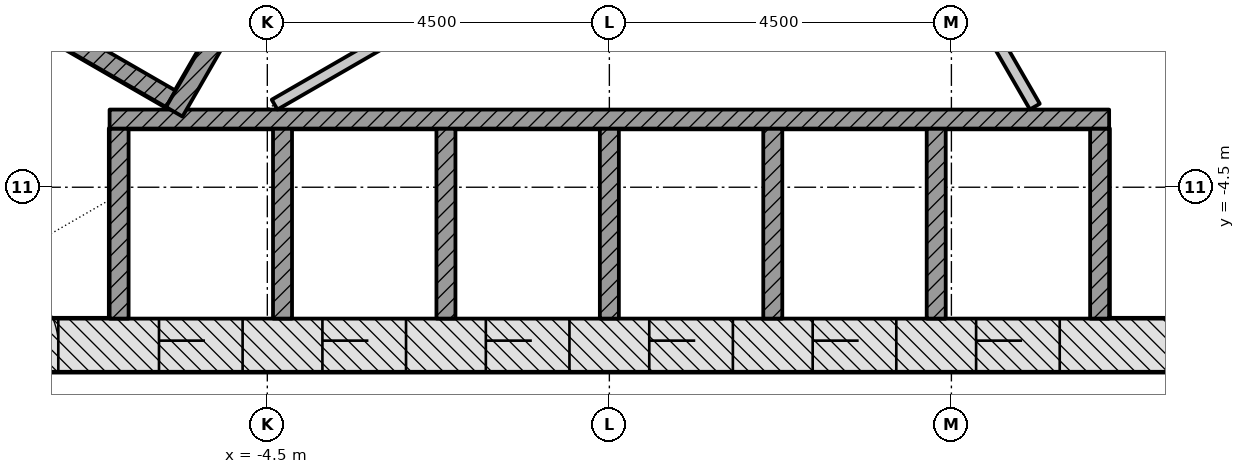
"""IFC4 building model, lengths in metres.
Left out: names, types, materials, properties, quantities, classifications, styles, units other than length and angle.
Written with IfcOpenShell. Run it as: python <this file> out.ifc"""

import sys

from ifc_helpers import new_model, si_unit, direction, frame, frame_2d, origin, place, context, subcontext, project, spatial, rectangle, extrude, element, fill, save


model = new_model("IFC4")
c1 = context("Model", 3, precision=1e-05, world=origin(), true_north=direction((0.0, 1.0)))
c2 = subcontext(c1, "Body", "Model", "MODEL_VIEW")
j1 = project(units=[si_unit("LENGTHUNIT", "METRE"), si_unit("PLANEANGLEUNIT", "RADIAN")], contexts=[c1])
p1 = place(None, origin())
s1 = spatial("IfcSite", under=j1, at=p1, CompositionType="ELEMENT")
p2 = place(p1, origin())
s2 = spatial("IfcBuilding", under=s1, at=p2, CompositionType="ELEMENT")
p3 = place(p2, frame((0.0, 0.0, 24.0)))
s3 = spatial("IfcBuildingStorey", under=s2, at=p3, CompositionType="ELEMENT", Elevation=24.0)
p4 = place(p3, frame((-9.229, -6.578, -0.2), z_axis=(0.0, 0.0, 1.0), x_axis=(1.0, 0.0, 0.0)))
e1 = element("IfcWall", 1, at=p4, inside=s3, PredefinedType="SHEAR", context=c2, shape_type="SweptSolid", body=[
    extrude(rectangle(XDim=18.458, YDim=0.7, at=frame_2d((9.229, 0.0))), origin(), (0.0, 0.0, 1.0), 3.6),
])
p5 = place(p4, frame((3.304, 0.0, 0.2)))
e2 = element("IfcOpeningElement", 2, at=p5, cuts=e1, PredefinedType="OPENING", context=c2, shape_type="SweptSolid", body=[
    extrude(rectangle(XDim=1.1, YDim=2.1, at=frame_2d((0.55, 1.05))), frame((0.0, 0.36, 0.0), z_axis=(0.0, -1.0, 0.0), x_axis=(1.0, 0.0, 0.0)), (0.0, 0.0, 1.0), 0.72),
])
p6 = place(p4, frame((5.454, 0.0, 0.2)))
e3 = element("IfcOpeningElement", 3, at=p6, cuts=e1, PredefinedType="OPENING", context=c2, shape_type="SweptSolid", body=[
    extrude(rectangle(XDim=1.1, YDim=2.1, at=frame_2d((0.55, 1.05))), frame((0.0, 0.36, 0.0), z_axis=(0.0, -1.0, 0.0), x_axis=(1.0, 0.0, 0.0)), (0.0, 0.0, 1.0), 0.72),
])
p7 = place(p4, frame((7.604, 0.0, 0.2)))
e4 = element("IfcOpeningElement", 4, at=p7, cuts=e1, PredefinedType="OPENING", context=c2, shape_type="SweptSolid", body=[
    extrude(rectangle(XDim=1.1, YDim=2.1, at=frame_2d((0.55, 1.05))), frame((0.0, 0.36, 0.0), z_axis=(0.0, -1.0, 0.0), x_axis=(1.0, 0.0, 0.0)), (0.0, 0.0, 1.0), 0.72),
])
p8 = place(p4, frame((9.754, 0.0, 0.2)))
e5 = element("IfcOpeningElement", 5, at=p8, cuts=e1, PredefinedType="OPENING", context=c2, shape_type="SweptSolid", body=[
    extrude(rectangle(XDim=1.1, YDim=2.1, at=frame_2d((0.55, 1.05))), frame((0.0, 0.36, 0.0), z_axis=(0.0, -1.0, 0.0), x_axis=(1.0, 0.0, 0.0)), (0.0, 0.0, 1.0), 0.72),
])
p9 = place(p4, frame((11.904, 0.0, 0.2)))
e6 = element("IfcOpeningElement", 6, at=p9, cuts=e1, PredefinedType="OPENING", context=c2, shape_type="SweptSolid", body=[
    extrude(rectangle(XDim=1.1, YDim=2.1, at=frame_2d((0.55, 1.05))), frame((0.0, 0.36, 0.0), z_axis=(0.0, -1.0, 0.0), x_axis=(1.0, 0.0, 0.0)), (0.0, 0.0, 1.0), 0.72),
])
p10 = place(p4, frame((14.054, 0.0, 0.2)))
e7 = element("IfcOpeningElement", 7, at=p10, cuts=e1, PredefinedType="OPENING", context=c2, shape_type="SweptSolid", body=[
    extrude(rectangle(XDim=1.1, YDim=2.1, at=frame_2d((0.55, 1.05))), frame((0.0, 0.36, 0.0), z_axis=(0.0, -1.0, 0.0), x_axis=(1.0, 0.0, 0.0)), (0.0, 0.0, 1.0), 0.72),
])
p11 = place(p4, frame((1.079, 0.0, 0.2)))
e8 = element("IfcOpeningElement", 8, at=p11, cuts=e1, PredefinedType="OPENING", context=c2, shape_type="SweptSolid", body=[
    extrude(rectangle(XDim=0.9, YDim=2.1, at=frame_2d((0.45, 1.05))), frame((0.0, 0.36, 0.0), z_axis=(0.0, -1.0, 0.0), x_axis=(1.0, 0.0, 0.0)), (0.0, 0.0, 1.0), 0.72),
])
p12 = place(p3, frame((10.311, -4.703, -0.2), z_axis=(0.0, 0.0, 1.0), x_axis=(-0.500001446645, 0.866024568562, 0.0)))
e9 = element("IfcWall", 9, at=p12, inside=s3, PredefinedType="SHEAR", context=c2, shape_type="SweptSolid", body=[
    extrude(rectangle(XDim=18.458, YDim=0.7, at=frame_2d((9.229, 0.0))), origin(), (0.0, 0.0, 1.0), 3.6),
])
p13 = place(p12, frame((8.7, 0.0, 0.2)))
e10 = element("IfcOpeningElement", 10, at=p13, cuts=e9, PredefinedType="OPENING", context=c2, shape_type="SweptSolid", body=[
    extrude(rectangle(XDim=1.0, YDim=2.1, at=frame_2d((0.5, 1.05))), frame((0.0, 0.36, 0.0), z_axis=(0.0, -1.0, 0.0), x_axis=(1.0, 0.0, 0.0)), (0.0, 0.0, 1.0), 0.72),
])
p14 = place(p12, frame((3.99, 0.0, 0.2)))
e11 = element("IfcOpeningElement", 11, at=p14, cuts=e9, PredefinedType="OPENING", context=c2, shape_type="SweptSolid", body=[
    extrude(rectangle(XDim=0.9, YDim=2.1, at=frame_2d((0.45, 1.05))), frame((0.0, 0.36, 0.0), z_axis=(0.0, -1.0, 0.0), x_axis=(1.0, 0.0, 0.0)), (0.0, 0.0, 1.0), 0.72),
])
p15 = place(p12, frame((13.539, 0.0, 0.2)))
e12 = element("IfcOpeningElement", 12, at=p15, cuts=e9, PredefinedType="OPENING", context=c2, shape_type="SweptSolid", body=[
    extrude(rectangle(XDim=0.9, YDim=2.1, at=frame_2d((0.45, 1.05))), frame((0.0, 0.36, 0.0), z_axis=(0.0, -1.0, 0.0), x_axis=(1.0, 0.0, 0.0)), (0.0, 0.0, 1.0), 0.72),
])
p16 = place(p3, frame((-1.083, 11.281, -0.2), z_axis=(0.0, 0.0, 1.0), x_axis=(-0.500001446645, -0.866024568562, 0.0)))
e13 = element("IfcWall", 13, at=p16, inside=s3, PredefinedType="SHEAR", context=c2, shape_type="SweptSolid", body=[
    extrude(rectangle(XDim=18.458, YDim=0.7, at=frame_2d((9.229, 0.0))), origin(), (0.0, 0.0, 1.0), 3.6),
])
p17 = place(p16, frame((8.979, 0.0, 0.2)))
e14 = element("IfcOpeningElement", 14, at=p17, cuts=e13, PredefinedType="OPENING", context=c2, shape_type="SweptSolid", body=[
    extrude(rectangle(XDim=1.2, YDim=2.1, at=frame_2d((0.6, 1.05))), frame((0.0, 0.36, 0.0), z_axis=(0.0, -1.0, 0.0), x_axis=(1.0, 0.0, 0.0)), (0.0, 0.0, 1.0), 0.72),
])
p18 = place(p16, frame((11.029, 0.0, 0.2)))
e15 = element("IfcOpeningElement", 15, at=p18, cuts=e13, PredefinedType="OPENING", context=c2, shape_type="SweptSolid", body=[
    extrude(rectangle(XDim=1.2, YDim=2.1, at=frame_2d((0.6, 1.05))), frame((0.0, 0.36, 0.0), z_axis=(0.0, -1.0, 0.0), x_axis=(1.0, 0.0, 0.0)), (0.0, 0.0, 1.0), 0.72),
])
for number, where, z_axis, x_axis in (
    (16, (-6.45, -6.228, -0.2), (0.0, 0.0, 1.0), (0.0, 1.0, 0.0)),
    (17, (-4.3, -6.228, -0.2), (0.0, 0.0, 1.0), (0.0, 1.0, 0.0)),
    (18, (-2.15, -6.228, -0.2), (0.0, 0.0, 1.0), (0.0, 1.0, 0.0)),
    (19, (0.0, -6.228, -0.2), (0.0, 0.0, 1.0), (0.0, 1.0, 0.0)),
    (20, (2.15, -6.228, -0.2), (0.0, 0.0, 1.0), (0.0, 1.0, 0.0)),
    (21, (4.3, -6.228, -0.2), (0.0, 0.0, 1.0), (0.0, 1.0, 0.0)),
    (22, (6.45, -6.228, -0.2), (0.0, 0.0, 1.0), (0.0, 1.0, 0.0)),
):
    element("IfcWall", number, at=place(p3, frame(where, z_axis=z_axis, x_axis=x_axis)), inside=s3, PredefinedType="PARTITIONING", context=c2, shape_type="SweptSolid", body=[
        extrude(rectangle(XDim=2.5, YDim=0.25, at=frame_2d((1.25, 0.0))), origin(), (0.0, 0.0, 1.0), 3.6),
    ])
p19 = place(p3, frame((-6.575, -3.603, 0.0), z_axis=(0.0, 0.0, 1.0), x_axis=(1.0, 0.0, 0.0)))
e23 = element("IfcWall", 23, at=p19, inside=s3, PredefinedType="PARTITIONING", context=c2, shape_type="SweptSolid", body=[
    extrude(rectangle(XDim=13.15, YDim=0.25, at=frame_2d((6.575, 0.0))), origin(), (0.0, 0.0, 1.0), 3.4),
])
p20 = place(p3, frame((-8.281, -1.887, -0.2), z_axis=(0.0, 0.0, 1.0), x_axis=(0.866032775405, -0.499987231761, 0.0)))
e24 = element("IfcWall", 24, at=p20, inside=s3, PredefinedType="PARTITIONING", context=c2, shape_type="SweptSolid", body=[
    extrude(rectangle(XDim=2.9, YDim=0.25, at=frame_2d((1.45, 0.0))), origin(), (0.0, 0.0, 1.0), 3.6),
])
p21 = place(p3, frame((0.176, 6.711, 0.0), z_axis=(0.0, 0.0, 1.0), x_axis=(-0.500004227369, -0.866022963098, 0.0)))
e25 = element("IfcWall", 25, at=p21, inside=s3, PredefinedType="PARTITIONING", context=c2, shape_type="SweptSolid", body=[
    extrude(rectangle(XDim=11.8, YDim=0.25, at=frame_2d((5.9, 0.0))), origin(), (0.0, 0.0, 1.0), 3.4),
])
p22 = place(p3, frame((-4.404, -3.413, 0.0), z_axis=(0.0, 0.0, 1.0), x_axis=(0.866022252853, 0.500005457533, 0.0)))
e26 = element("IfcWall", 26, at=p22, inside=s3, PredefinedType="PARTITIONING", context=c2, shape_type="SweptSolid", body=[
    extrude(rectangle(XDim=11.749, YDim=0.15, at=frame_2d((5.875, 0.0))), origin(), (0.0, 0.0, 1.0), 3.4),
])
p23 = place(p22, frame((3.875, 0.0, 0.0)))
e27 = element("IfcOpeningElement", 27, at=p23, cuts=e26, PredefinedType="OPENING", context=c2, shape_type="SweptSolid", body=[
    extrude(rectangle(XDim=0.9, YDim=2.1, at=frame_2d((0.45, 1.05))), frame((0.0, 0.085, 0.0), z_axis=(0.0, -1.0, 0.0), x_axis=(1.0, 0.0, 0.0)), (0.0, 0.0, 1.0), 0.17),
])
p24 = place(p3, frame((5.598, -3.439, 0.0), z_axis=(0.0, 0.0, 1.0), x_axis=(-0.500007155043, 0.866021272779, 0.0)))
e28 = element("IfcWall", 28, at=p24, inside=s3, PredefinedType="PARTITIONING", context=c2, shape_type="SweptSolid", body=[
    extrude(rectangle(XDim=4.949, YDim=0.15, at=frame_2d((2.474, 0.0))), origin(), (0.0, 0.0, 1.0), 3.4),
])
p25 = place(p3, frame((-17.208, -3.699, 0.0), z_axis=(0.0, 0.0, 1.0), x_axis=(0.499997567621, 0.866026808115, 0.0)))
e29 = element("IfcWall", 29, at=p25, inside=s3, PredefinedType="PARTITIONING", context=c2, shape_type="SweptSolid", body=[
    extrude(rectangle(XDim=23.736, YDim=0.15, at=frame_2d((11.868, 0.0))), origin(), (0.0, 0.0, 1.0), 2.768),
])
p26 = place(p25, frame((16.656, 0.0, 0.0)))
e30 = element("IfcOpeningElement", 30, at=p26, cuts=e29, PredefinedType="OPENING", context=c2, shape_type="SweptSolid", body=[
    extrude(rectangle(XDim=1.1, YDim=2.1, at=frame_2d((0.55, 1.05))), frame((0.0, 0.085, 0.0), z_axis=(0.0, -1.0, 0.0), x_axis=(1.0, 0.0, 0.0)), (0.0, 0.0, 1.0), 0.17),
])
p27 = place(p25, frame((14.662, 0.0, 0.0)))
e31 = element("IfcOpeningElement", 31, at=p27, cuts=e29, PredefinedType="OPENING", context=c2, shape_type="SweptSolid", body=[
    extrude(rectangle(XDim=1.1, YDim=2.1, at=frame_2d((0.55, 1.05))), frame((0.0, 0.085, 0.0), z_axis=(0.0, -1.0, 0.0), x_axis=(1.0, 0.0, 0.0)), (0.0, 0.0, 1.0), 0.17),
])
p28 = place(p25, frame((5.273, 0.0, 0.0)))
e32 = element("IfcOpeningElement", 32, at=p28, cuts=e29, PredefinedType="OPENING", context=c2, shape_type="SweptSolid", body=[
    extrude(rectangle(XDim=1.0, YDim=2.1, at=frame_2d((0.5, 1.05))), frame((0.0, 0.085, 0.0), z_axis=(0.0, -1.0, 0.0), x_axis=(1.0, 0.0, 0.0)), (0.0, 0.0, 1.0), 0.17),
])
p29 = place(p3, frame((5.981, 8.446, 0.0), z_axis=(0.0, 0.0, 1.0), x_axis=(0.499996620721, -0.866027354803, 0.0)))
e33 = element("IfcWall", 33, at=p29, inside=s3, PredefinedType="PARTITIONING", context=c2, shape_type="SweptSolid", body=[
    extrude(rectangle(XDim=15.057, YDim=0.15, at=frame_2d((7.528, 0.0))), origin(), (0.0, 0.0, 1.0), 2.768),
])
p30 = place(p29, frame((9.087, 0.0, 0.0)))
e34 = element("IfcOpeningElement", 34, at=p30, cuts=e33, PredefinedType="OPENING", context=c2, shape_type="SweptSolid", body=[
    extrude(rectangle(XDim=1.1, YDim=2.1, at=frame_2d((0.55, 1.05))), frame((0.0, 0.085, 0.0), z_axis=(0.0, -1.0, 0.0), x_axis=(1.0, 0.0, 0.0)), (0.0, 0.0, 1.0), 0.17),
])
p31 = place(p29, frame((7.128, 0.0, 0.0)))
e35 = element("IfcOpeningElement", 35, at=p31, cuts=e33, PredefinedType="OPENING", context=c2, shape_type="SweptSolid", body=[
    extrude(rectangle(XDim=1.1, YDim=2.1, at=frame_2d((0.55, 1.05))), frame((0.0, 0.085, 0.0), z_axis=(0.0, -1.0, 0.0), x_axis=(1.0, 0.0, 0.0)), (0.0, 0.0, 1.0), 0.17),
])
p32 = place(p5, origin())
e36 = element("IfcDoor", 36, at=p32, inside=s3, OperationType="DOUBLE_DOOR_SLIDING", PredefinedType="DOOR", context=c2, shape_type="SweptSolid", body=[
    extrude(rectangle(XDim=1.1, YDim=2.1, at=frame_2d((0.55, 1.05))), frame((0.0, 0.025, 0.0), z_axis=(0.0, -1.0, 0.0), x_axis=(1.0, 0.0, 0.0)), (0.0, 0.0, 1.0), 0.05),
])
fill(e2, e36)
p33 = place(p6, origin())
e37 = element("IfcDoor", 37, at=p33, inside=s3, OperationType="DOUBLE_DOOR_SLIDING", PredefinedType="DOOR", context=c2, shape_type="SweptSolid", body=[
    extrude(rectangle(XDim=1.1, YDim=2.1, at=frame_2d((0.55, 1.05))), frame((0.0, 0.025, 0.0), z_axis=(0.0, -1.0, 0.0), x_axis=(1.0, 0.0, 0.0)), (0.0, 0.0, 1.0), 0.05),
])
fill(e3, e37)
p34 = place(p7, origin())
e38 = element("IfcDoor", 38, at=p34, inside=s3, OperationType="DOUBLE_DOOR_SLIDING", PredefinedType="DOOR", context=c2, shape_type="SweptSolid", body=[
    extrude(rectangle(XDim=1.1, YDim=2.1, at=frame_2d((0.55, 1.05))), frame((0.0, 0.025, 0.0), z_axis=(0.0, -1.0, 0.0), x_axis=(1.0, 0.0, 0.0)), (0.0, 0.0, 1.0), 0.05),
])
fill(e4, e38)
p35 = place(p8, origin())
e39 = element("IfcDoor", 39, at=p35, inside=s3, OperationType="DOUBLE_DOOR_SLIDING", PredefinedType="DOOR", context=c2, shape_type="SweptSolid", body=[
    extrude(rectangle(XDim=1.1, YDim=2.1, at=frame_2d((0.55, 1.05))), frame((0.0, 0.025, 0.0), z_axis=(0.0, -1.0, 0.0), x_axis=(1.0, 0.0, 0.0)), (0.0, 0.0, 1.0), 0.05),
])
fill(e5, e39)
p36 = place(p9, origin())
e40 = element("IfcDoor", 40, at=p36, inside=s3, OperationType="DOUBLE_DOOR_SLIDING", PredefinedType="DOOR", context=c2, shape_type="SweptSolid", body=[
    extrude(rectangle(XDim=1.1, YDim=2.1, at=frame_2d((0.55, 1.05))), frame((0.0, 0.025, 0.0), z_axis=(0.0, -1.0, 0.0), x_axis=(1.0, 0.0, 0.0)), (0.0, 0.0, 1.0), 0.05),
])
fill(e6, e40)
p37 = place(p10, origin())
e41 = element("IfcDoor", 41, at=p37, inside=s3, OperationType="DOUBLE_DOOR_SLIDING", PredefinedType="DOOR", context=c2, shape_type="SweptSolid", body=[
    extrude(rectangle(XDim=1.1, YDim=2.1, at=frame_2d((0.55, 1.05))), frame((0.0, 0.025, 0.0), z_axis=(0.0, -1.0, 0.0), x_axis=(1.0, 0.0, 0.0)), (0.0, 0.0, 1.0), 0.05),
])
fill(e7, e41)
p38 = place(p11, origin())
e42 = element("IfcDoor", 42, at=p38, inside=s3, OperationType="SINGLE_SWING_LEFT", PredefinedType="DOOR", context=c2, shape_type="SweptSolid", body=[
    extrude(rectangle(XDim=0.9, YDim=2.1, at=frame_2d((0.45, 1.05))), frame((0.0, 0.075, 0.0), z_axis=(0.0, -1.0, 0.0), x_axis=(1.0, 0.0, 0.0)), (0.0, 0.0, 1.0), 0.15),
])
fill(e8, e42)
save(model, sys.argv[1])
